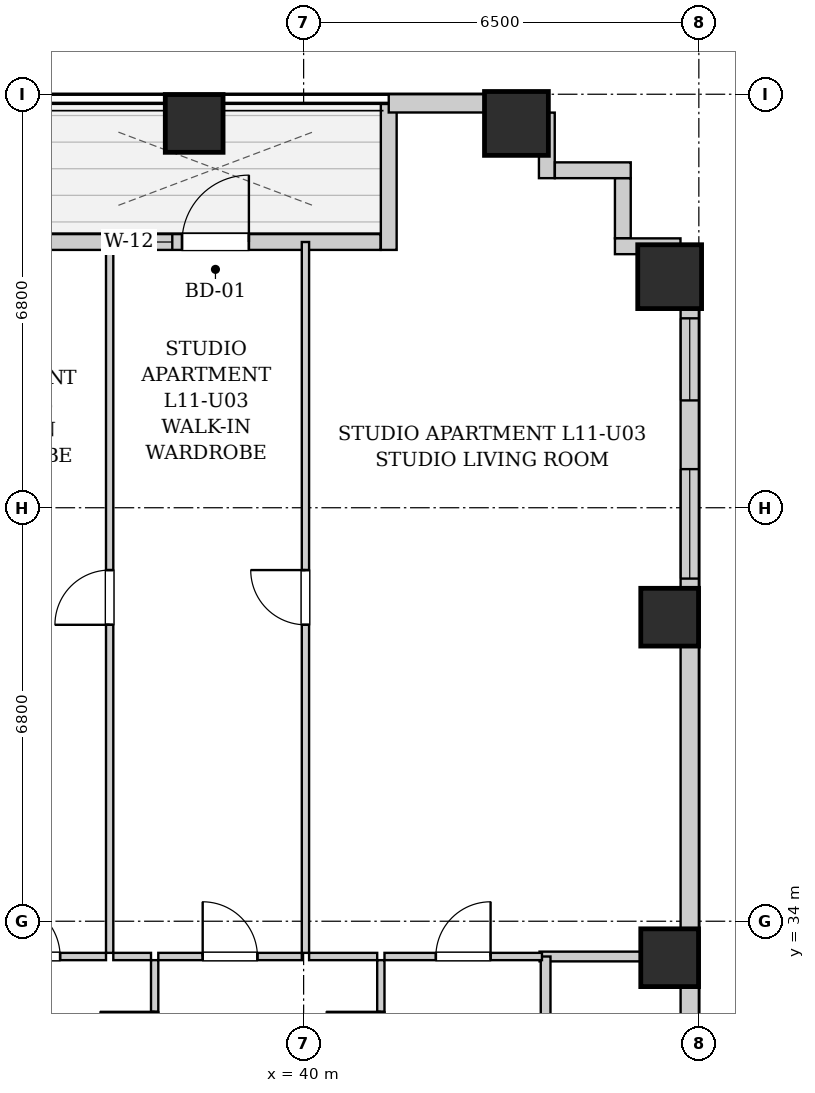
"""IFC4 building model, lengths in metres.
Left out: names, types, materials, properties, quantities, classifications, styles, units other than length and angle.
Written with IfcOpenShell. Run it as: python <this file> out.ifc"""

import sys

from ifc_helpers import new_model, si_unit, direction, frame, frame_2d, origin, origin_2d, place, context, subcontext, project, spatial, rectangle, extrude, element, fill, save


model = new_model("IFC4")
c1 = context("Model", 3, precision=1e-05, world=origin(), true_north=direction((0.0, 1.0)))
c2 = subcontext(c1, "Body", "Model", "MODEL_VIEW")
j1 = project(units=[si_unit("LENGTHUNIT", "METRE"), si_unit("PLANEANGLEUNIT", "RADIAN")], contexts=[c1])
p1 = place(None, origin())
s1 = spatial("IfcSite", under=j1, at=p1, CompositionType="ELEMENT")
p2 = place(p1, origin())
s2 = spatial("IfcBuilding", under=s1, at=p2, CompositionType="ELEMENT")
p3 = place(p2, frame((0.0, 0.0, 45.0)))
s3 = spatial("IfcBuildingStorey", under=s2, at=p3, CompositionType="ELEMENT", Elevation=45.0)
p4 = place(p3, frame((38.2, 47.12, 0.0), z_axis=(0.0, 0.0, 1.0), x_axis=(1.0, 0.0, 0.0)))
e1 = element("IfcColumn", 1, at=p4, inside=s3, PredefinedType="COLUMN", context=c2, shape_type="SweptSolid", body=[
    extrude(rectangle(XDim=0.95, YDim=0.95, at=origin_2d()), origin(), (0.0, 0.0, 1.0), 3.2),
])
p5 = place(p3, frame((43.5, 47.12, 0.0), z_axis=(0.0, 0.0, 1.0), x_axis=(1.0, 0.0, 0.0)))
e2 = element("IfcColumn", 2, at=p5, inside=s3, PredefinedType="COLUMN", context=c2, shape_type="SweptSolid", body=[
    extrude(rectangle(XDim=1.05, YDim=1.05, at=origin_2d()), origin(), (0.0, 0.0, 1.0), 3.2),
])
for number, where, z_axis, x_axis in (
    (3, (46.02, 33.4, 0.0), (0.0, 0.0, 1.0), (1.0, 0.0, 0.0)),
    (4, (46.02, 39.0, 0.0), (0.0, 0.0, 1.0), (1.0, 0.0, 0.0)),
):
    element("IfcColumn", number, at=place(p3, frame(where, z_axis=z_axis, x_axis=x_axis)), inside=s3, PredefinedType="COLUMN", context=c2, shape_type="SweptSolid", body=[
        extrude(rectangle(XDim=0.95, YDim=0.95, at=origin_2d()), origin(), (0.0, 0.0, 1.0), 3.2),
    ])
p6 = place(p3, frame((46.02, 44.6, 0.0), z_axis=(0.0, 0.0, 1.0), x_axis=(1.0, 0.0, 0.0)))
e5 = element("IfcColumn", 5, at=p6, inside=s3, PredefinedType="COLUMN", context=c2, shape_type="SweptSolid", body=[
    extrude(rectangle(XDim=1.05, YDim=1.05, at=origin_2d()), origin(), (0.0, 0.0, 1.0), 3.2),
])
p7 = place(p3, frame((35.834, 45.17, 0.0), z_axis=(0.0, 0.0, 1.0), x_axis=(1.0, 0.0, 0.0)))
e6 = element("IfcWall", 6, at=p7, inside=s3, PredefinedType="SOLIDWALL", context=c2, shape_type="SweptSolid", body=[
    extrude(rectangle(XDim=5.432, YDim=0.26, at=frame_2d((2.716, 0.0))), origin(), (0.0, 0.0, 1.0), 2.94),
])
p8 = place(p7, frame((2.166, 0.0, 0.0)))
e7 = element("IfcOpeningElement", 7, at=p8, cuts=e6, PredefinedType="OPENING", context=c2, shape_type="SweptSolid", body=[
    extrude(rectangle(XDim=1.1, YDim=2.0, at=frame_2d((0.55, 1.0))), frame((0.0, 0.14, 0.0), z_axis=(0.0, -1.0, 0.0), x_axis=(1.0, 0.0, 0.0)), (0.0, 0.0, 1.0), 0.28),
])
p9 = place(p7, frame((1.326, 0.0, 0.55)))
e8 = element("IfcOpeningElement", 8, at=p9, cuts=e6, PredefinedType="OPENING", context=c2, shape_type="SweptSolid", body=[
    extrude(rectangle(XDim=0.68, YDim=1.2, at=frame_2d((0.34, 0.6))), frame((0.0, 0.14, 0.0), z_axis=(0.0, -1.0, 0.0), x_axis=(1.0, 0.0, 0.0)), (0.0, 0.0, 1.0), 0.28),
])
p10 = place(p3, frame((41.4, 45.04, 0.0), z_axis=(0.0, 0.0, 1.0), x_axis=(0.0, 1.0, 0.0)))
e9 = element("IfcWall", 9, at=p10, inside=s3, PredefinedType="SOLIDWALL", context=c2, shape_type="SweptSolid", body=[
    extrude(rectangle(XDim=2.4, YDim=0.26, at=frame_2d((1.2, 0.0))), origin(), (0.0, 0.0, 1.0), 2.94),
])
p11 = place(p3, frame((41.4, 47.45, 0.0), z_axis=(0.0, 0.0, 1.0), x_axis=(1.0, 0.0, 0.0)))
e10 = element("IfcWall", 10, at=p11, inside=s3, PredefinedType="SOLIDWALL", context=c2, shape_type="SweptSolid", body=[
    extrude(rectangle(XDim=2.6, YDim=0.3, at=frame_2d((1.3, 0.0))), origin(), (0.0, 0.0, 1.0), 1.975),
])
p12 = place(p3, frame((46.35, 45.1, 0.0), z_axis=(0.0, 0.0, 1.0), x_axis=(0.0, -1.0, 0.0)))
e11 = element("IfcWall", 11, at=p12, inside=s3, PredefinedType="SOLIDWALL", context=c2, shape_type="SweptSolid", body=[
    extrude(rectangle(XDim=42.6, YDim=0.3, at=frame_2d((21.3, 0.0))), origin(), (0.0, 0.0, 1.0), 1.975),
])
p13 = place(p12, frame((37.575, 0.0, 0.55)))
e12 = element("IfcOpeningElement", 12, at=p13, cuts=e11, PredefinedType="OPENING", context=c2, shape_type="SweptSolid", body=[
    extrude(rectangle(XDim=1.8, YDim=1.2, at=frame_2d((0.9, 0.6))), frame((0.0, 0.16, 0.0), z_axis=(0.0, -1.0, 0.0), x_axis=(1.0, 0.0, 0.0)), (0.0, 0.0, 1.0), 0.32),
])
p14 = place(p12, frame((34.85, 0.0, 0.55)))
e13 = element("IfcOpeningElement", 13, at=p14, cuts=e11, PredefinedType="OPENING", context=c2, shape_type="SweptSolid", body=[
    extrude(rectangle(XDim=1.35, YDim=1.2, at=frame_2d((0.675, 0.6))), frame((0.0, 0.16, 0.0), z_axis=(0.0, -1.0, 0.0), x_axis=(1.0, 0.0, 0.0)), (0.0, 0.0, 1.0), 0.32),
])
p15 = place(p12, frame((3.665, 0.0, 0.55)))
e14 = element("IfcOpeningElement", 14, at=p15, cuts=e11, PredefinedType="OPENING", context=c2, shape_type="SweptSolid", body=[
    extrude(rectangle(XDim=1.8, YDim=1.2, at=frame_2d((0.9, 0.6))), frame((0.0, 0.16, 0.0), z_axis=(0.0, -1.0, 0.0), x_axis=(1.0, 0.0, 0.0)), (0.0, 0.0, 1.0), 0.32),
])
p16 = place(p12, frame((1.185, 0.0, 0.55)))
e15 = element("IfcOpeningElement", 15, at=p16, cuts=e11, PredefinedType="OPENING", context=c2, shape_type="SweptSolid", body=[
    extrude(rectangle(XDim=1.35, YDim=1.2, at=frame_2d((0.675, 0.6))), frame((0.0, 0.16, 0.0), z_axis=(0.0, -1.0, 0.0), x_axis=(1.0, 0.0, 0.0)), (0.0, 0.0, 1.0), 0.32),
])
p17 = place(p12, frame((27.225, 0.0, 0.55)))
e16 = element("IfcOpeningElement", 16, at=p17, cuts=e11, PredefinedType="OPENING", context=c2, shape_type="SweptSolid", body=[
    extrude(rectangle(XDim=1.8, YDim=1.2, at=frame_2d((0.9, 0.6))), frame((0.0, 0.16, 0.0), z_axis=(0.0, -1.0, 0.0), x_axis=(1.0, 0.0, 0.0)), (0.0, 0.0, 1.0), 0.32),
])
p18 = place(p12, frame((17.1, 0.0, 0.55)))
e17 = element("IfcOpeningElement", 17, at=p18, cuts=e11, PredefinedType="OPENING", context=c2, shape_type="SweptSolid", body=[
    extrude(rectangle(XDim=1.8, YDim=1.2, at=frame_2d((0.9, 0.6))), frame((0.0, 0.16, 0.0), z_axis=(0.0, -1.0, 0.0), x_axis=(1.0, 0.0, 0.0)), (0.0, 0.0, 1.0), 0.32),
])
p19 = place(p3, frame((44.0, 47.298, 0.0), z_axis=(0.0, 0.0, 1.0), x_axis=(0.0, -1.0, 0.0)))
e18 = element("IfcWall", 18, at=p19, inside=s3, PredefinedType="SOLIDWALL", context=c2, shape_type="SweptSolid", body=[
    extrude(rectangle(XDim=1.078, YDim=0.26, at=frame_2d((0.539, 0.0))), origin(), (0.0, 0.0, 1.0), 2.94),
])
p20 = place(p3, frame((44.132, 46.35, 0.0), z_axis=(0.0, 0.0, 1.0), x_axis=(1.0, 0.0, 0.0)))
e19 = element("IfcWall", 19, at=p20, inside=s3, PredefinedType="SOLIDWALL", context=c2, shape_type="SweptSolid", body=[
    extrude(rectangle(XDim=1.248, YDim=0.26, at=frame_2d((0.624, 0.0))), origin(), (0.0, 0.0, 1.0), 2.94),
])
p21 = place(p3, frame((45.25, 46.218, 0.0), z_axis=(0.0, 0.0, 1.0), x_axis=(0.0, -1.0, 0.0)))
e20 = element("IfcWall", 20, at=p21, inside=s3, PredefinedType="SOLIDWALL", context=c2, shape_type="SweptSolid", body=[
    extrude(rectangle(XDim=0.986, YDim=0.26, at=frame_2d((0.493, 0.0))), origin(), (0.0, 0.0, 1.0), 2.94),
])
p22 = place(p3, frame((45.12, 45.1, 0.0), z_axis=(0.0, 0.0, 1.0), x_axis=(1.0, 0.0, 0.0)))
e21 = element("IfcWall", 21, at=p22, inside=s3, PredefinedType="SOLIDWALL", context=c2, shape_type="SweptSolid", body=[
    extrude(rectangle(XDim=1.078, YDim=0.26, at=frame_2d((0.539, 0.0))), origin(), (0.0, 0.0, 1.0), 2.94),
])
p23 = place(p3, frame((43.88, 33.42, 0.0), z_axis=(0.0, 0.0, 1.0), x_axis=(1.0, 0.0, 0.0)))
e22 = element("IfcWall", 22, at=p23, inside=s3, PredefinedType="PARTITIONING", context=c2, shape_type="SweptSolid", body=[
    extrude(rectangle(XDim=2.34, YDim=0.16, at=frame_2d((1.17, 0.0))), origin(), (0.0, 0.0, 1.0), 2.94),
])
p24 = place(p3, frame((43.98, 30.76, 0.0), z_axis=(0.0, 0.0, 1.0), x_axis=(0.0, 1.0, 0.0)))
e23 = element("IfcWall", 23, at=p24, inside=s3, PredefinedType="PARTITIONING", context=c2, shape_type="SweptSolid", body=[
    extrude(rectangle(XDim=2.66, YDim=0.16, at=frame_2d((1.33, 0.0))), origin(), (0.0, 0.0, 1.0), 2.94),
])
p25 = place(p3, frame((37.55, 30.76, 0.0), z_axis=(0.0, 0.0, 1.0), x_axis=(0.0, 1.0, 0.0)))
e24 = element("IfcWall", 24, at=p25, inside=s3, PredefinedType="PARTITIONING", context=c2, shape_type="SweptSolid", body=[
    extrude(rectangle(XDim=2.6, YDim=0.12, at=frame_2d((1.3, 0.0))), origin(), (0.0, 0.0, 1.0), 2.94),
])
p26 = place(p25, frame((0.85, 0.0, 0.0)))
e25 = element("IfcOpeningElement", 25, at=p26, cuts=e24, PredefinedType="OPENING", context=c2, shape_type="SweptSolid", body=[
    extrude(rectangle(XDim=0.9, YDim=2.05, at=frame_2d((0.45, 1.025))), frame((0.0, 0.07, 0.0), z_axis=(0.0, -1.0, 0.0), x_axis=(1.0, 0.0, 0.0)), (0.0, 0.0, 1.0), 0.14),
])
p27 = place(p3, frame((34.34, 33.42, 0.0), z_axis=(0.0, 0.0, 1.0), x_axis=(1.0, 0.0, 0.0)))
e26 = element("IfcWall", 26, at=p27, inside=s3, PredefinedType="PARTITIONING", context=c2, shape_type="SweptSolid", body=[
    extrude(rectangle(XDim=2.41, YDim=0.12, at=frame_2d((1.205, 0.0))), origin(), (0.0, 0.0, 1.0), 2.94),
])
p28 = place(p27, frame((0.755, 0.0, 0.0)))
e27 = element("IfcOpeningElement", 27, at=p28, cuts=e26, PredefinedType="OPENING", context=c2, shape_type="SweptSolid", body=[
    extrude(rectangle(XDim=0.9, YDim=2.05, at=frame_2d((0.45, 1.025))), frame((0.0, 0.07, 0.0), z_axis=(0.0, -1.0, 0.0), x_axis=(1.0, 0.0, 0.0)), (0.0, 0.0, 1.0), 0.14),
])
p29 = place(p3, frame((36.87, 33.42, 0.0), z_axis=(0.0, 0.0, 1.0), x_axis=(1.0, 0.0, 0.0)))
e28 = element("IfcWall", 28, at=p29, inside=s3, PredefinedType="PARTITIONING", context=c2, shape_type="SweptSolid", body=[
    extrude(rectangle(XDim=0.62, YDim=0.12, at=frame_2d((0.31, 0.0))), origin(), (0.0, 0.0, 1.0), 2.94),
])
p30 = place(p3, frame((41.27, 30.76, 0.0), z_axis=(0.0, 0.0, 1.0), x_axis=(0.0, 1.0, 0.0)))
e29 = element("IfcWall", 29, at=p30, inside=s3, PredefinedType="PARTITIONING", context=c2, shape_type="SweptSolid", body=[
    extrude(rectangle(XDim=2.6, YDim=0.12, at=frame_2d((1.3, 0.0))), origin(), (0.0, 0.0, 1.0), 2.94),
])
p31 = place(p30, frame((0.85, 0.0, 0.0)))
e30 = element("IfcOpeningElement", 30, at=p31, cuts=e29, PredefinedType="OPENING", context=c2, shape_type="SweptSolid", body=[
    extrude(rectangle(XDim=0.9, YDim=2.05, at=frame_2d((0.45, 1.025))), frame((0.0, 0.07, 0.0), z_axis=(0.0, -1.0, 0.0), x_axis=(1.0, 0.0, 0.0)), (0.0, 0.0, 1.0), 0.14),
])
p32 = place(p3, frame((37.61, 33.42, 0.0), z_axis=(0.0, 0.0, 1.0), x_axis=(1.0, 0.0, 0.0)))
e31 = element("IfcWall", 31, at=p32, inside=s3, PredefinedType="PARTITIONING", context=c2, shape_type="SweptSolid", body=[
    extrude(rectangle(XDim=2.36, YDim=0.12, at=frame_2d((1.18, 0.0))), origin(), (0.0, 0.0, 1.0), 2.94),
])
p33 = place(p32, frame((0.73, 0.0, 0.0)))
e32 = element("IfcOpeningElement", 32, at=p33, cuts=e31, PredefinedType="OPENING", context=c2, shape_type="SweptSolid", body=[
    extrude(rectangle(XDim=0.9, YDim=2.05, at=frame_2d((0.45, 1.025))), frame((0.0, 0.07, 0.0), z_axis=(0.0, -1.0, 0.0), x_axis=(1.0, 0.0, 0.0)), (0.0, 0.0, 1.0), 0.14),
])
p34 = place(p3, frame((40.09, 33.42, 0.0), z_axis=(0.0, 0.0, 1.0), x_axis=(1.0, 0.0, 0.0)))
e33 = element("IfcWall", 33, at=p34, inside=s3, PredefinedType="PARTITIONING", context=c2, shape_type="SweptSolid", body=[
    extrude(rectangle(XDim=1.12, YDim=0.12, at=frame_2d((0.56, 0.0))), origin(), (0.0, 0.0, 1.0), 2.94),
])
p35 = place(p3, frame((41.33, 33.42, 0.0), z_axis=(0.0, 0.0, 1.0), x_axis=(1.0, 0.0, 0.0)))
e34 = element("IfcWall", 34, at=p35, inside=s3, PredefinedType="PARTITIONING", context=c2, shape_type="SweptSolid", body=[
    extrude(rectangle(XDim=2.59, YDim=0.12, at=frame_2d((1.295, 0.0))), origin(), (0.0, 0.0, 1.0), 2.94),
])
p36 = place(p35, frame((0.845, 0.0, 0.0)))
e35 = element("IfcOpeningElement", 35, at=p36, cuts=e34, PredefinedType="OPENING", context=c2, shape_type="SweptSolid", body=[
    extrude(rectangle(XDim=0.9, YDim=2.05, at=frame_2d((0.45, 1.025))), frame((0.0, 0.07, 0.0), z_axis=(0.0, -1.0, 0.0), x_axis=(1.0, 0.0, 0.0)), (0.0, 0.0, 1.0), 0.14),
])
p37 = place(p3, frame((36.81, 33.48, 0.0), z_axis=(0.0, 0.0, 1.0), x_axis=(0.0, 1.0, 0.0)))
e36 = element("IfcWall", 36, at=p37, inside=s3, PredefinedType="PARTITIONING", context=c2, shape_type="SweptSolid", body=[
    extrude(rectangle(XDim=11.69, YDim=0.12, at=frame_2d((5.845, 0.0))), origin(), (0.0, 0.0, 1.0), 2.94),
])
p38 = place(p37, frame((5.395, 0.0, 0.0)))
e37 = element("IfcOpeningElement", 37, at=p38, cuts=e36, PredefinedType="OPENING", context=c2, shape_type="SweptSolid", body=[
    extrude(rectangle(XDim=0.9, YDim=2.05, at=frame_2d((0.45, 1.025))), frame((0.0, 0.07, 0.0), z_axis=(0.0, -1.0, 0.0), x_axis=(1.0, 0.0, 0.0)), (0.0, 0.0, 1.0), 0.14),
])
p39 = place(p3, frame((40.03, 33.48, 0.0), z_axis=(0.0, 0.0, 1.0), x_axis=(0.0, 1.0, 0.0)))
e38 = element("IfcWall", 38, at=p39, inside=s3, PredefinedType="PARTITIONING", context=c2, shape_type="SweptSolid", body=[
    extrude(rectangle(XDim=11.69, YDim=0.12, at=frame_2d((5.845, 0.0))), origin(), (0.0, 0.0, 1.0), 2.94),
])
p40 = place(p39, frame((5.395, 0.0, 0.0)))
e39 = element("IfcOpeningElement", 39, at=p40, cuts=e38, PredefinedType="OPENING", context=c2, shape_type="SweptSolid", body=[
    extrude(rectangle(XDim=0.9, YDim=2.05, at=frame_2d((0.45, 1.025))), frame((0.0, 0.07, 0.0), z_axis=(0.0, -1.0, 0.0), x_axis=(1.0, 0.0, 0.0)), (0.0, 0.0, 1.0), 0.14),
])
p41 = place(p26, origin())
e40 = element("IfcDoor", 40, at=p41, inside=s3, OperationType="SINGLE_SWING_RIGHT", PredefinedType="DOOR", context=c2, shape_type="SweptSolid", body=[
    extrude(rectangle(XDim=0.9, YDim=2.05, at=frame_2d((0.45, 1.025))), frame((0.0, 0.025, 0.0), z_axis=(0.0, -1.0, 0.0), x_axis=(1.0, 0.0, 0.0)), (0.0, 0.0, 1.0), 0.05),
])
fill(e25, e40)
p42 = place(p28, origin())
e41 = element("IfcDoor", 41, at=p42, inside=s3, OperationType="SINGLE_SWING_LEFT", PredefinedType="DOOR", context=c2, shape_type="SweptSolid", body=[
    extrude(rectangle(XDim=0.9, YDim=2.05, at=frame_2d((0.45, 1.025))), frame((0.0, 0.025, 0.0), z_axis=(0.0, -1.0, 0.0), x_axis=(1.0, 0.0, 0.0)), (0.0, 0.0, 1.0), 0.05),
])
fill(e27, e41)
p43 = place(p31, origin())
e42 = element("IfcDoor", 42, at=p43, inside=s3, OperationType="SINGLE_SWING_RIGHT", PredefinedType="DOOR", context=c2, shape_type="SweptSolid", body=[
    extrude(rectangle(XDim=0.9, YDim=2.05, at=frame_2d((0.45, 1.025))), frame((0.0, 0.025, 0.0), z_axis=(0.0, -1.0, 0.0), x_axis=(1.0, 0.0, 0.0)), (0.0, 0.0, 1.0), 0.05),
])
fill(e30, e42)
p44 = place(p33, origin())
e43 = element("IfcDoor", 43, at=p44, inside=s3, OperationType="SINGLE_SWING_LEFT", PredefinedType="DOOR", context=c2, shape_type="SweptSolid", body=[
    extrude(rectangle(XDim=0.9, YDim=2.05, at=frame_2d((0.45, 1.025))), frame((0.0, 0.025, 0.0), z_axis=(0.0, -1.0, 0.0), x_axis=(1.0, 0.0, 0.0)), (0.0, 0.0, 1.0), 0.05),
])
fill(e32, e43)
p45 = place(p36, origin())
e44 = element("IfcDoor", 44, at=p45, inside=s3, OperationType="SINGLE_SWING_RIGHT", PredefinedType="DOOR", context=c2, shape_type="SweptSolid", body=[
    extrude(rectangle(XDim=0.9, YDim=2.05, at=frame_2d((0.45, 1.025))), frame((0.0, 0.025, 0.0), z_axis=(0.0, -1.0, 0.0), x_axis=(1.0, 0.0, 0.0)), (0.0, 0.0, 1.0), 0.05),
])
fill(e35, e44)
p46 = place(p38, origin())
e45 = element("IfcDoor", 45, at=p46, inside=s3, OperationType="SINGLE_SWING_LEFT", PredefinedType="DOOR", context=c2, shape_type="SweptSolid", body=[
    extrude(rectangle(XDim=0.9, YDim=2.05, at=frame_2d((0.45, 1.025))), frame((0.0, 0.025, 0.0), z_axis=(0.0, -1.0, 0.0), x_axis=(1.0, 0.0, 0.0)), (0.0, 0.0, 1.0), 0.05),
])
fill(e37, e45)
p47 = place(p40, origin())
e46 = element("IfcDoor", 46, at=p47, inside=s3, OperationType="SINGLE_SWING_RIGHT", PredefinedType="DOOR", context=c2, shape_type="SweptSolid", body=[
    extrude(rectangle(XDim=0.9, YDim=2.05, at=frame_2d((0.45, 1.025))), frame((0.0, 0.025, 0.0), z_axis=(0.0, -1.0, 0.0), x_axis=(1.0, 0.0, 0.0)), (0.0, 0.0, 1.0), 0.05),
])
fill(e39, e46)
p48 = place(p8, origin())
e47 = element("IfcDoor", 47, at=p48, inside=s3, OperationType="SINGLE_SWING_RIGHT", PredefinedType="DOOR", context=c2, shape_type="SweptSolid", body=[
    extrude(rectangle(XDim=1.1, YDim=2.0, at=frame_2d((0.55, 1.0))), frame((0.0, 0.025, 0.0), z_axis=(0.0, -1.0, 0.0), x_axis=(1.0, 0.0, 0.0)), (0.0, 0.0, 1.0), 0.05),
])
fill(e7, e47)
p49 = place(p9, origin())
e48 = element("IfcWindow", 48, at=p49, inside=s3, PartitioningType="SINGLE_PANEL", PredefinedType="WINDOW", context=c2, shape_type="SweptSolid", body=[
    extrude(rectangle(XDim=0.68, YDim=1.2, at=frame_2d((0.34, 0.6))), frame((0.0, 0.03, 0.0), z_axis=(0.0, -1.0, 0.0), x_axis=(1.0, 0.0, 0.0)), (0.0, 0.0, 1.0), 0.06),
])
fill(e8, e48)
p50 = place(p15, origin())
e49 = element("IfcWindow", 49, at=p50, inside=s3, PartitioningType="DOUBLE_PANEL_VERTICAL", PredefinedType="WINDOW", context=c2, shape_type="SweptSolid", body=[
    extrude(rectangle(XDim=1.8, YDim=1.2, at=frame_2d((0.9, 0.6))), frame((0.0, 0.03, 0.0), z_axis=(0.0, -1.0, 0.0), x_axis=(1.0, 0.0, 0.0)), (0.0, 0.0, 1.0), 0.06),
])
fill(e14, e49)
p51 = place(p16, origin())
e50 = element("IfcWindow", 50, at=p51, inside=s3, PartitioningType="SINGLE_PANEL", PredefinedType="WINDOW", context=c2, shape_type="SweptSolid", body=[
    extrude(rectangle(XDim=1.35, YDim=1.2, at=frame_2d((0.675, 0.6))), frame((0.0, 0.03, 0.0), z_axis=(0.0, -1.0, 0.0), x_axis=(1.0, 0.0, 0.0)), (0.0, 0.0, 1.0), 0.06),
])
fill(e15, e50)
save(model, sys.argv[1])
